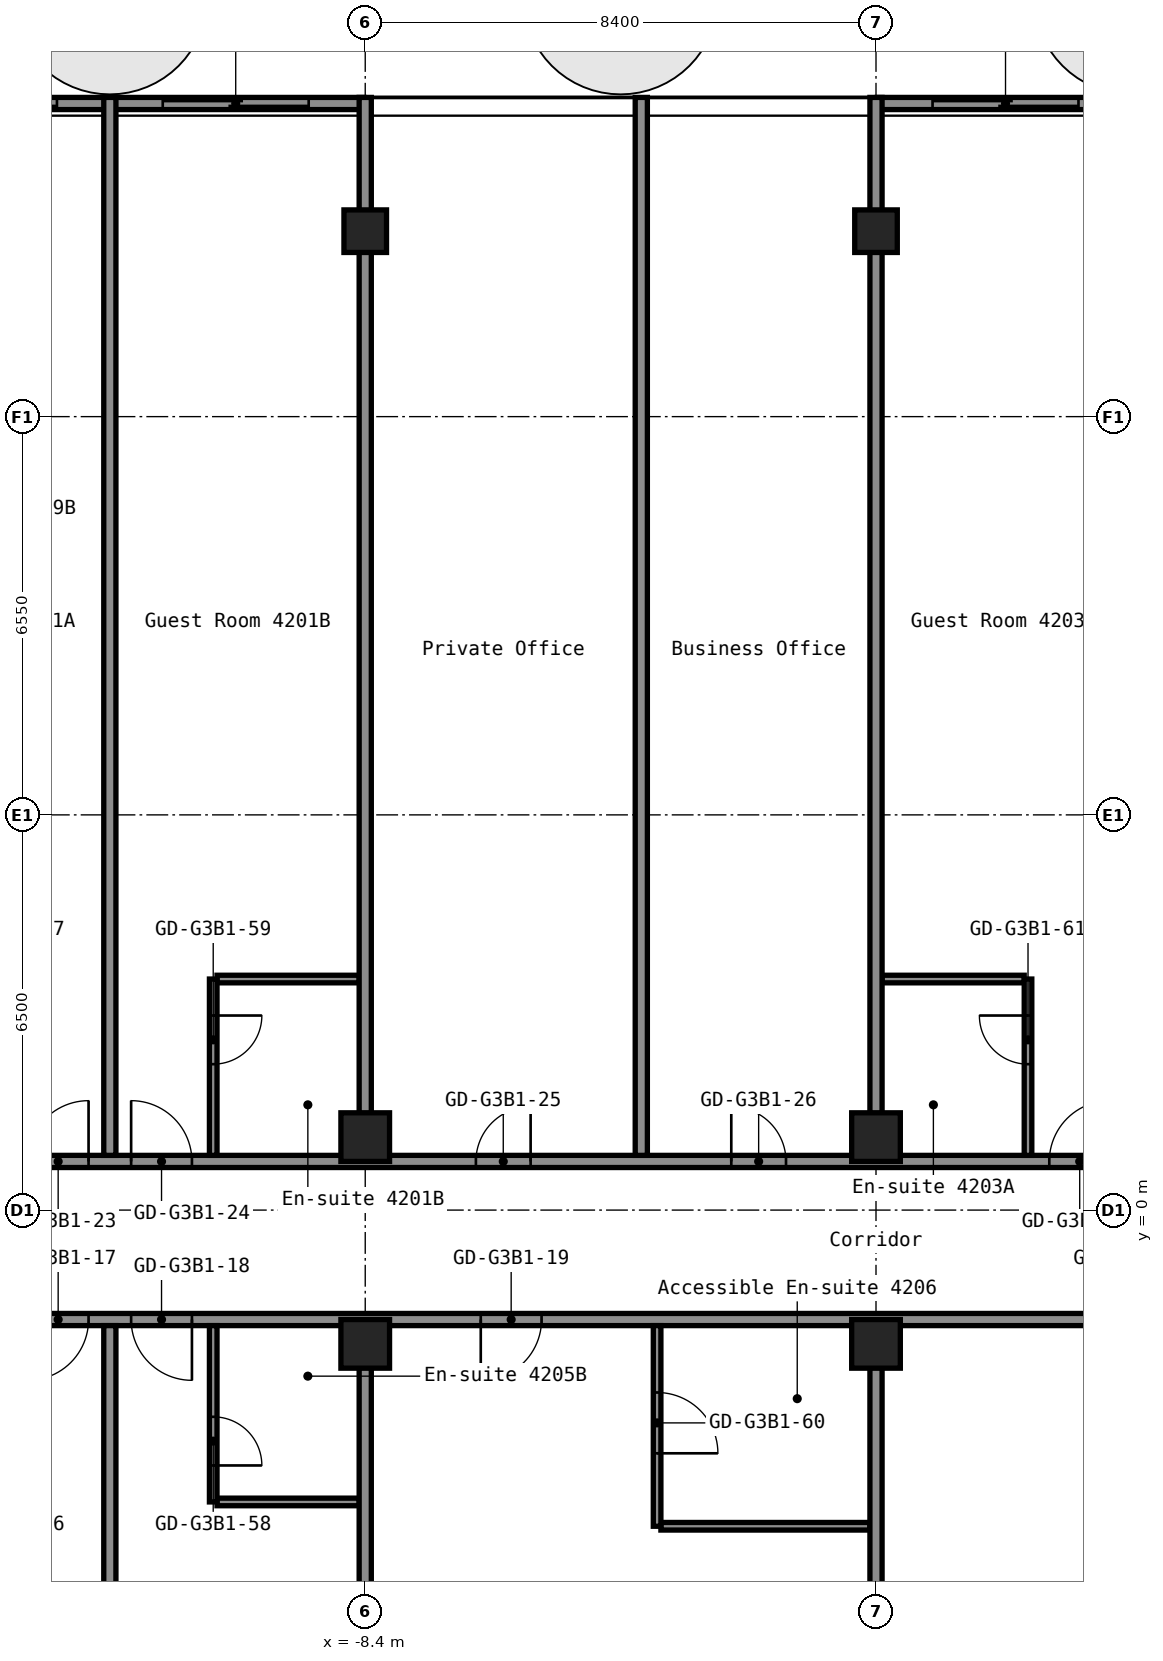
"""IFC4 building model, lengths in metres.
Left out: names, types, materials, properties, quantities, classifications, styles, units other than length and angle.
Written with IfcOpenShell. Run it as: python <this file> out.ifc"""

import sys

from ifc_helpers import new_model, si_unit, direction, frame, frame_2d, origin, origin_2d, place, context, subcontext, project, spatial, rectangle, hollow_rectangle, extrude, element, fill, save


model = new_model("IFC4")
c1 = context("Model", 3, precision=1e-05, world=origin(), true_north=direction((0.0, 1.0)))
c2 = subcontext(c1, "Body", "Model", "MODEL_VIEW")
j1 = project(units=[si_unit("LENGTHUNIT", "METRE"), si_unit("PLANEANGLEUNIT", "RADIAN")], contexts=[c1])
p1 = place(None, origin())
s1 = spatial("IfcSite", under=j1, at=p1, CompositionType="ELEMENT")
p2 = place(p1, origin())
s2 = spatial("IfcBuilding", under=s1, at=p2, CompositionType="ELEMENT")
p3 = place(p2, frame((0.0, 0.0, 150.2)))
s3 = spatial("IfcBuildingStorey", under=s2, at=p3, CompositionType="ELEMENT", Elevation=150.2)
for number, where, z_axis, x_axis in (
    (1, (-8.4, -2.2, 0.0), (0.0, 0.0, 1.0), (1.0, 0.0, 0.0)),
    (2, (-8.4, 1.2, 0.0), (0.0, 0.0, 1.0), (1.0, 0.0, 0.0)),
):
    element("IfcColumn", number, at=place(p3, frame(where, z_axis=z_axis, x_axis=x_axis)), inside=s3, PredefinedType="COLUMN", context=c2, shape_type="SweptSolid", body=[
        extrude(hollow_rectangle(XDim=0.8, YDim=0.8, WallThickness=0.032, at=origin_2d()), origin(), (0.0, 0.0, 1.0), 2.75),
    ])
p4 = place(p3, frame((-8.4, 16.1, 0.0), z_axis=(0.0, 0.0, 1.0), x_axis=(1.0, 0.0, 0.0)))
e3 = element("IfcColumn", 3, at=p4, inside=s3, PredefinedType="COLUMN", context=c2, shape_type="SweptSolid", body=[
    extrude(hollow_rectangle(XDim=0.7, YDim=0.7, WallThickness=0.028, at=origin_2d()), origin(), (0.0, 0.0, 1.0), 2.75),
])
for number, where, z_axis, x_axis in (
    (4, (0.0, -2.2, 0.0), (0.0, 0.0, 1.0), (1.0, 0.0, 0.0)),
    (5, (0.0, 1.2, 0.0), (0.0, 0.0, 1.0), (1.0, 0.0, 0.0)),
):
    element("IfcColumn", number, at=place(p3, frame(where, z_axis=z_axis, x_axis=x_axis)), inside=s3, PredefinedType="COLUMN", context=c2, shape_type="SweptSolid", body=[
        extrude(hollow_rectangle(XDim=0.8, YDim=0.8, WallThickness=0.032, at=origin_2d()), origin(), (0.0, 0.0, 1.0), 2.75),
    ])
p5 = place(p3, frame((0.0, 16.1, 0.0), z_axis=(0.0, 0.0, 1.0), x_axis=(1.0, 0.0, 0.0)))
e6 = element("IfcColumn", 6, at=p5, inside=s3, PredefinedType="COLUMN", context=c2, shape_type="SweptSolid", body=[
    extrude(hollow_rectangle(XDim=0.7, YDim=0.7, WallThickness=0.028, at=origin_2d()), origin(), (0.0, 0.0, 1.0), 2.75),
])
p6 = place(p3, frame((-3.538, -5.2, 0.0), z_axis=(0.0, 0.0, 1.0), x_axis=(1.0, 0.0, 0.0)))
e7 = element("IfcWall", 7, at=p6, inside=s3, PredefinedType="PARTITIONING", context=c2, shape_type="SweptSolid", body=[
    extrude(rectangle(XDim=3.438, YDim=0.125, at=frame_2d((1.719, 0.0))), origin(), (0.0, 0.0, 1.0), 2.75),
])
p7 = place(p3, frame((-10.837, -4.8, 0.0), z_axis=(0.0, 0.0, 1.0), x_axis=(1.0, 0.0, 0.0)))
e8 = element("IfcWall", 8, at=p7, inside=s3, PredefinedType="PARTITIONING", context=c2, shape_type="SweptSolid", body=[
    extrude(rectangle(XDim=2.337, YDim=0.125, at=frame_2d((1.169, 0.0))), origin(), (0.0, 0.0, 1.0), 2.75),
])
p8 = place(p3, frame((-16.8, -1.8, 0.0), z_axis=(0.0, 0.0, 1.0), x_axis=(1.0, 0.0, 0.0)))
e9 = element("IfcWall", 9, at=p8, inside=s3, PredefinedType="PARTITIONING", context=c2, shape_type="SweptSolid", body=[
    extrude(rectangle(XDim=33.6, YDim=0.2, at=frame_2d((16.8, 0.0))), origin(), (0.0, 0.0, 1.0), 2.75),
])
p9 = place(p8, frame((2.85, 0.0, 0.0)))
e10 = element("IfcOpeningElement", 10, at=p9, cuts=e9, PredefinedType="OPENING", context=c2, shape_type="SweptSolid", body=[
    extrude(rectangle(XDim=1.0, YDim=2.1, at=frame_2d((0.5, 1.05))), frame((0.0, 0.11, 0.0), z_axis=(0.0, -1.0, 0.0), x_axis=(1.0, 0.0, 0.0)), (0.0, 0.0, 1.0), 0.22),
])
p10 = place(p8, frame((4.55, 0.0, 0.0)))
e11 = element("IfcOpeningElement", 11, at=p10, cuts=e9, PredefinedType="OPENING", context=c2, shape_type="SweptSolid", body=[
    extrude(rectangle(XDim=1.0, YDim=2.1, at=frame_2d((0.5, 1.05))), frame((0.0, 0.11, 0.0), z_axis=(0.0, -1.0, 0.0), x_axis=(1.0, 0.0, 0.0)), (0.0, 0.0, 1.0), 0.22),
])
p11 = place(p8, frame((10.3, 0.0, 0.0)))
e12 = element("IfcOpeningElement", 12, at=p11, cuts=e9, PredefinedType="OPENING", context=c2, shape_type="SweptSolid", body=[
    extrude(rectangle(XDim=1.0, YDim=2.1, at=frame_2d((0.5, 1.05))), frame((0.0, 0.11, 0.0), z_axis=(0.0, -1.0, 0.0), x_axis=(1.0, 0.0, 0.0)), (0.0, 0.0, 1.0), 0.22),
])
p12 = place(p8, frame((20.5, 0.0, 0.0)))
e13 = element("IfcOpeningElement", 13, at=p12, cuts=e9, PredefinedType="OPENING", context=c2, shape_type="SweptSolid", body=[
    extrude(rectangle(XDim=1.0, YDim=2.1, at=frame_2d((0.5, 1.05))), frame((0.0, 0.11, 0.0), z_axis=(0.0, -1.0, 0.0), x_axis=(1.0, 0.0, 0.0)), (0.0, 0.0, 1.0), 0.22),
])
p13 = place(p8, frame((28.05, 0.0, 0.0)))
e14 = element("IfcOpeningElement", 14, at=p13, cuts=e9, PredefinedType="OPENING", context=c2, shape_type="SweptSolid", body=[
    extrude(rectangle(XDim=1.0, YDim=2.1, at=frame_2d((0.5, 1.05))), frame((0.0, 0.11, 0.0), z_axis=(0.0, -1.0, 0.0), x_axis=(1.0, 0.0, 0.0)), (0.0, 0.0, 1.0), 0.22),
])
p14 = place(p8, frame((29.75, 0.0, 0.0)))
e15 = element("IfcOpeningElement", 15, at=p14, cuts=e9, PredefinedType="OPENING", context=c2, shape_type="SweptSolid", body=[
    extrude(rectangle(XDim=1.0, YDim=2.1, at=frame_2d((0.5, 1.05))), frame((0.0, 0.11, 0.0), z_axis=(0.0, -1.0, 0.0), x_axis=(1.0, 0.0, 0.0)), (0.0, 0.0, 1.0), 0.22),
])
p15 = place(p3, frame((-16.8, 0.8, 0.0), z_axis=(0.0, 0.0, 1.0), x_axis=(1.0, 0.0, 0.0)))
e16 = element("IfcWall", 16, at=p15, inside=s3, PredefinedType="PARTITIONING", context=c2, shape_type="SweptSolid", body=[
    extrude(rectangle(XDim=33.6, YDim=0.2, at=frame_2d((16.8, 0.0))), origin(), (0.0, 0.0, 1.0), 2.75),
])
p16 = place(p15, frame((2.85, 0.0, 0.0)))
e17 = element("IfcOpeningElement", 17, at=p16, cuts=e16, PredefinedType="OPENING", context=c2, shape_type="SweptSolid", body=[
    extrude(rectangle(XDim=1.0, YDim=2.1, at=frame_2d((0.5, 1.05))), frame((0.0, 0.11, 0.0), z_axis=(0.0, -1.0, 0.0), x_axis=(1.0, 0.0, 0.0)), (0.0, 0.0, 1.0), 0.22),
])
p17 = place(p15, frame((4.55, 0.0, 0.0)))
e18 = element("IfcOpeningElement", 18, at=p17, cuts=e16, PredefinedType="OPENING", context=c2, shape_type="SweptSolid", body=[
    extrude(rectangle(XDim=1.0, YDim=2.1, at=frame_2d((0.5, 1.05))), frame((0.0, 0.11, 0.0), z_axis=(0.0, -1.0, 0.0), x_axis=(1.0, 0.0, 0.0)), (0.0, 0.0, 1.0), 0.22),
])
p18 = place(p15, frame((10.22, 0.0, 0.0)))
e19 = element("IfcOpeningElement", 19, at=p18, cuts=e16, PredefinedType="OPENING", context=c2, shape_type="SweptSolid", body=[
    extrude(rectangle(XDim=0.9, YDim=2.1, at=frame_2d((0.45, 1.05))), frame((0.0, 0.11, 0.0), z_axis=(0.0, -1.0, 0.0), x_axis=(1.0, 0.0, 0.0)), (0.0, 0.0, 1.0), 0.22),
])
p19 = place(p15, frame((14.42, 0.0, 0.0)))
e20 = element("IfcOpeningElement", 20, at=p19, cuts=e16, PredefinedType="OPENING", context=c2, shape_type="SweptSolid", body=[
    extrude(rectangle(XDim=0.9, YDim=2.1, at=frame_2d((0.45, 1.05))), frame((0.0, 0.11, 0.0), z_axis=(0.0, -1.0, 0.0), x_axis=(1.0, 0.0, 0.0)), (0.0, 0.0, 1.0), 0.22),
])
p20 = place(p15, frame((19.65, 0.0, 0.0)))
e21 = element("IfcOpeningElement", 21, at=p20, cuts=e16, PredefinedType="OPENING", context=c2, shape_type="SweptSolid", body=[
    extrude(rectangle(XDim=1.0, YDim=2.1, at=frame_2d((0.5, 1.05))), frame((0.0, 0.11, 0.0), z_axis=(0.0, -1.0, 0.0), x_axis=(1.0, 0.0, 0.0)), (0.0, 0.0, 1.0), 0.22),
])
p21 = place(p15, frame((21.35, 0.0, 0.0)))
e22 = element("IfcOpeningElement", 22, at=p21, cuts=e16, PredefinedType="OPENING", context=c2, shape_type="SweptSolid", body=[
    extrude(rectangle(XDim=1.0, YDim=2.1, at=frame_2d((0.5, 1.05))), frame((0.0, 0.11, 0.0), z_axis=(0.0, -1.0, 0.0), x_axis=(1.0, 0.0, 0.0)), (0.0, 0.0, 1.0), 0.22),
])
p22 = place(p15, frame((28.05, 0.0, 0.0)))
e23 = element("IfcOpeningElement", 23, at=p22, cuts=e16, PredefinedType="OPENING", context=c2, shape_type="SweptSolid", body=[
    extrude(rectangle(XDim=1.0, YDim=2.1, at=frame_2d((0.5, 1.05))), frame((0.0, 0.11, 0.0), z_axis=(0.0, -1.0, 0.0), x_axis=(1.0, 0.0, 0.0)), (0.0, 0.0, 1.0), 0.22),
])
p23 = place(p15, frame((29.75, 0.0, 0.0)))
e24 = element("IfcOpeningElement", 24, at=p23, cuts=e16, PredefinedType="OPENING", context=c2, shape_type="SweptSolid", body=[
    extrude(rectangle(XDim=1.0, YDim=2.1, at=frame_2d((0.5, 1.05))), frame((0.0, 0.11, 0.0), z_axis=(0.0, -1.0, 0.0), x_axis=(1.0, 0.0, 0.0)), (0.0, 0.0, 1.0), 0.22),
])
for number, where, z_axis, x_axis in (
    (25, (-10.837, 3.8, 0.0), (0.0, 0.0, 1.0), (1.0, 0.0, 0.0)),
    (26, (0.1, 3.8, 0.0), (0.0, 0.0, 1.0), (1.0, 0.0, 0.0)),
):
    element("IfcWall", number, at=place(p3, frame(where, z_axis=z_axis, x_axis=x_axis)), inside=s3, PredefinedType="PARTITIONING", context=c2, shape_type="SweptSolid", body=[
        extrude(rectangle(XDim=2.337, YDim=0.125, at=frame_2d((1.169, 0.0))), origin(), (0.0, 0.0, 1.0), 2.75),
    ])
for number, where, z_axis, x_axis in (
    (27, (-12.6, -19.3, 0.0), (0.0, 0.0, 1.0), (0.0, 1.0, 0.0)),
    (28, (-12.6, 0.9, 0.0), (0.0, 0.0, 1.0), (0.0, 1.0, 0.0)),
):
    element("IfcWall", number, at=place(p3, frame(where, z_axis=z_axis, x_axis=x_axis)), inside=s3, PredefinedType="PARTITIONING", context=c2, shape_type="SweptSolid", body=[
        extrude(rectangle(XDim=17.4, YDim=0.2, at=frame_2d((8.7, 0.0))), origin(), (0.0, 0.0, 1.0), 2.75),
    ])
p24 = place(p3, frame((-10.9, -4.8, 0.0), z_axis=(0.0, 0.0, 1.0), x_axis=(0.0, 1.0, 0.0)))
e29 = element("IfcWall", 29, at=p24, inside=s3, PredefinedType="PARTITIONING", context=c2, shape_type="SweptSolid", body=[
    extrude(rectangle(XDim=2.9, YDim=0.125, at=frame_2d((1.45, 0.0))), origin(), (0.0, 0.0, 1.0), 2.75),
])
p25 = place(p24, frame((0.6, 0.0, 0.0)))
e30 = element("IfcOpeningElement", 30, at=p25, cuts=e29, PredefinedType="OPENING", context=c2, shape_type="SweptSolid", body=[
    extrude(rectangle(XDim=0.8, YDim=2.1, at=frame_2d((0.4, 1.05))), frame((0.0, 0.073, 0.0), z_axis=(0.0, -1.0, 0.0), x_axis=(1.0, 0.0, 0.0)), (0.0, 0.0, 1.0), 0.145),
])
p26 = place(p3, frame((-10.9, 0.9, 0.0), z_axis=(0.0, 0.0, 1.0), x_axis=(0.0, 1.0, 0.0)))
e31 = element("IfcWall", 31, at=p26, inside=s3, PredefinedType="PARTITIONING", context=c2, shape_type="SweptSolid", body=[
    extrude(rectangle(XDim=2.9, YDim=0.125, at=frame_2d((1.45, 0.0))), origin(), (0.0, 0.0, 1.0), 2.75),
])
p27 = place(p26, frame((1.5, 0.0, 0.0)))
e32 = element("IfcOpeningElement", 32, at=p27, cuts=e31, PredefinedType="OPENING", context=c2, shape_type="SweptSolid", body=[
    extrude(rectangle(XDim=0.8, YDim=2.1, at=frame_2d((0.4, 1.05))), frame((0.0, 0.073, 0.0), z_axis=(0.0, -1.0, 0.0), x_axis=(1.0, 0.0, 0.0)), (0.0, 0.0, 1.0), 0.145),
])
for number, where, z_axis, x_axis in (
    (33, (-8.4, -19.3, 0.0), (0.0, 0.0, 1.0), (0.0, 1.0, 0.0)),
    (34, (-8.4, 1.59, 0.0), (0.0, 0.0, 1.0), (0.0, 1.0, 0.0)),
):
    element("IfcWall", number, at=place(p3, frame(where, z_axis=z_axis, x_axis=x_axis)), inside=s3, PredefinedType="PARTITIONING", context=c2, shape_type="SweptSolid", body=[
        extrude(rectangle(XDim=16.71, YDim=0.2, at=frame_2d((8.355, 0.0))), origin(), (0.0, 0.0, 1.0), 2.75),
    ])
p28 = place(p3, frame((-3.86, 0.9, 0.0), z_axis=(0.0, 0.0, 1.0), x_axis=(0.0, 1.0, 0.0)))
e35 = element("IfcWall", 35, at=p28, inside=s3, PredefinedType="PARTITIONING", context=c2, shape_type="SweptSolid", body=[
    extrude(rectangle(XDim=17.4, YDim=0.2, at=frame_2d((8.7, 0.0))), origin(), (0.0, 0.0, 1.0), 2.75),
])
p29 = place(p3, frame((-3.6, -5.2, 0.0), z_axis=(0.0, 0.0, 1.0), x_axis=(0.0, 1.0, 0.0)))
e36 = element("IfcWall", 36, at=p29, inside=s3, PredefinedType="PARTITIONING", context=c2, shape_type="SweptSolid", body=[
    extrude(rectangle(XDim=3.3, YDim=0.125, at=frame_2d((1.65, 0.0))), origin(), (0.0, 0.0, 1.0), 2.75),
])
p30 = place(p29, frame((1.2, 0.0, 0.0)))
e37 = element("IfcOpeningElement", 37, at=p30, cuts=e36, PredefinedType="OPENING", context=c2, shape_type="SweptSolid", body=[
    extrude(rectangle(XDim=1.0, YDim=2.1, at=frame_2d((0.5, 1.05))), frame((0.0, 0.073, 0.0), z_axis=(0.0, -1.0, 0.0), x_axis=(1.0, 0.0, 0.0)), (0.0, 0.0, 1.0), 0.145),
])
for number, where, z_axis, x_axis in (
    (38, (0.0, -19.3, 0.0), (0.0, 0.0, 1.0), (0.0, 1.0, 0.0)),
    (39, (0.0, 1.59, 0.0), (0.0, 0.0, 1.0), (0.0, 1.0, 0.0)),
):
    element("IfcWall", number, at=place(p3, frame(where, z_axis=z_axis, x_axis=x_axis)), inside=s3, PredefinedType="PARTITIONING", context=c2, shape_type="SweptSolid", body=[
        extrude(rectangle(XDim=16.71, YDim=0.2, at=frame_2d((8.355, 0.0))), origin(), (0.0, 0.0, 1.0), 2.75),
    ])
p31 = place(p3, frame((2.5, 0.9, 0.0), z_axis=(0.0, 0.0, 1.0), x_axis=(0.0, 1.0, 0.0)))
e40 = element("IfcWall", 40, at=p31, inside=s3, PredefinedType="PARTITIONING", context=c2, shape_type="SweptSolid", body=[
    extrude(rectangle(XDim=2.9, YDim=0.125, at=frame_2d((1.45, 0.0))), origin(), (0.0, 0.0, 1.0), 2.75),
])
p32 = place(p31, frame((1.5, 0.0, 0.0)))
e41 = element("IfcOpeningElement", 41, at=p32, cuts=e40, PredefinedType="OPENING", context=c2, shape_type="SweptSolid", body=[
    extrude(rectangle(XDim=0.8, YDim=2.1, at=frame_2d((0.4, 1.05))), frame((0.0, 0.073, 0.0), z_axis=(0.0, -1.0, 0.0), x_axis=(1.0, 0.0, 0.0)), (0.0, 0.0, 1.0), 0.145),
])
p33 = place(p3, frame((4.24, 18.2, 0.0), z_axis=(0.0, 0.0, 1.0), x_axis=(-1.0, 0.0, 0.0)))
p34 = place(p33, frame((0.91, 0.0, 0.0)))
p35 = place(p34, frame((2.4, 0.0, 0.0), z_axis=(0.0, 0.0, 1.0), x_axis=(-1.0, 0.0, 0.0)))
e42 = element("IfcDoor", 42, at=p35, inside=s3, OperationType="SLIDING_TO_LEFT", PredefinedType="DOOR", context=c2, shape_type="SweptSolid", body=[
    extrude(rectangle(XDim=2.4, YDim=2.2, at=frame_2d((1.2, 1.1))), frame((0.0, 0.025, 0.0), z_axis=(0.0, -1.0, 0.0), x_axis=(1.0, 0.0, 0.0)), (0.0, 0.0, 1.0), 0.05),
])
p36 = place(p3, frame((-8.42, 18.2, 0.0), z_axis=(0.0, 0.0, 1.0), x_axis=(-1.0, 0.0, 0.0)))
p37 = place(p36, frame((0.91, 0.0, 0.0)))
p38 = place(p37, frame((2.4, 0.0, 0.0), z_axis=(0.0, 0.0, 1.0), x_axis=(-1.0, 0.0, 0.0)))
e43 = element("IfcDoor", 43, at=p38, inside=s3, OperationType="SLIDING_TO_LEFT", PredefinedType="DOOR", context=c2, shape_type="SweptSolid", body=[
    extrude(rectangle(XDim=2.4, YDim=2.2, at=frame_2d((1.2, 1.1))), frame((0.0, 0.025, 0.0), z_axis=(0.0, -1.0, 0.0), x_axis=(1.0, 0.0, 0.0)), (0.0, 0.0, 1.0), 0.05),
])
p39 = place(p3, frame((-12.56, 18.2, 0.0), z_axis=(0.0, 0.0, 1.0), x_axis=(-1.0, 0.0, 0.0)))
p40 = place(p39, frame((0.91, 0.0, 0.0)))
p41 = place(p40, frame((2.4, 0.0, 0.0), z_axis=(0.0, 0.0, 1.0), x_axis=(-1.0, 0.0, 0.0)))
e44 = element("IfcDoor", 44, at=p41, inside=s3, OperationType="SLIDING_TO_LEFT", PredefinedType="DOOR", context=c2, shape_type="SweptSolid", body=[
    extrude(rectangle(XDim=2.4, YDim=2.2, at=frame_2d((1.2, 1.1))), frame((0.0, 0.025, 0.0), z_axis=(0.0, -1.0, 0.0), x_axis=(1.0, 0.0, 0.0)), (0.0, 0.0, 1.0), 0.05),
])
p42 = place(p9, origin())
e45 = element("IfcDoor", 45, at=p42, inside=s3, OperationType="SINGLE_SWING_LEFT", PredefinedType="DOOR", context=c2, shape_type="SweptSolid", body=[
    extrude(rectangle(XDim=1.0, YDim=2.1, at=frame_2d((0.5, 1.05))), frame((0.0, 0.025, 0.0), z_axis=(0.0, -1.0, 0.0), x_axis=(1.0, 0.0, 0.0)), (0.0, 0.0, 1.0), 0.05),
])
fill(e10, e45)
p43 = place(p10, origin())
e46 = element("IfcDoor", 46, at=p43, inside=s3, OperationType="SINGLE_SWING_RIGHT", PredefinedType="DOOR", context=c2, shape_type="SweptSolid", body=[
    extrude(rectangle(XDim=1.0, YDim=2.1, at=frame_2d((0.5, 1.05))), frame((0.0, 0.025, 0.0), z_axis=(0.0, -1.0, 0.0), x_axis=(1.0, 0.0, 0.0)), (0.0, 0.0, 1.0), 0.05),
])
fill(e11, e46)
p44 = place(p11, origin())
e47 = element("IfcDoor", 47, at=p44, inside=s3, OperationType="SINGLE_SWING_LEFT", PredefinedType="DOOR", context=c2, shape_type="SweptSolid", body=[
    extrude(rectangle(XDim=1.0, YDim=2.1, at=frame_2d((0.5, 1.05))), frame((0.0, 0.025, 0.0), z_axis=(0.0, -1.0, 0.0), x_axis=(1.0, 0.0, 0.0)), (0.0, 0.0, 1.0), 0.05),
])
fill(e12, e47)
p45 = place(p16, origin())
e48 = element("IfcDoor", 48, at=p45, inside=s3, OperationType="SINGLE_SWING_LEFT", PredefinedType="DOOR", context=c2, shape_type="SweptSolid", body=[
    extrude(rectangle(XDim=1.0, YDim=2.1, at=frame_2d((0.5, 1.05))), frame((0.0, 0.025, 0.0), z_axis=(0.0, -1.0, 0.0), x_axis=(1.0, 0.0, 0.0)), (0.0, 0.0, 1.0), 0.05),
])
fill(e17, e48)
p46 = place(p17, origin())
e49 = element("IfcDoor", 49, at=p46, inside=s3, OperationType="SINGLE_SWING_RIGHT", PredefinedType="DOOR", context=c2, shape_type="SweptSolid", body=[
    extrude(rectangle(XDim=1.0, YDim=2.1, at=frame_2d((0.5, 1.05))), frame((0.0, 0.025, 0.0), z_axis=(0.0, -1.0, 0.0), x_axis=(1.0, 0.0, 0.0)), (0.0, 0.0, 1.0), 0.05),
])
fill(e18, e49)
p47 = place(p18, origin())
e50 = element("IfcDoor", 50, at=p47, inside=s3, OperationType="SINGLE_SWING_LEFT", PredefinedType="DOOR", context=c2, shape_type="SweptSolid", body=[
    extrude(rectangle(XDim=0.9, YDim=2.1, at=frame_2d((0.45, 1.05))), frame((0.0, 0.025, 0.0), z_axis=(0.0, -1.0, 0.0), x_axis=(1.0, 0.0, 0.0)), (0.0, 0.0, 1.0), 0.05),
])
fill(e19, e50)
p48 = place(p19, origin())
e51 = element("IfcDoor", 51, at=p48, inside=s3, OperationType="SINGLE_SWING_RIGHT", PredefinedType="DOOR", context=c2, shape_type="SweptSolid", body=[
    extrude(rectangle(XDim=0.9, YDim=2.1, at=frame_2d((0.45, 1.05))), frame((0.0, 0.025, 0.0), z_axis=(0.0, -1.0, 0.0), x_axis=(1.0, 0.0, 0.0)), (0.0, 0.0, 1.0), 0.05),
])
fill(e20, e51)
p49 = place(p20, origin())
e52 = element("IfcDoor", 52, at=p49, inside=s3, OperationType="SINGLE_SWING_LEFT", PredefinedType="DOOR", context=c2, shape_type="SweptSolid", body=[
    extrude(rectangle(XDim=1.0, YDim=2.1, at=frame_2d((0.5, 1.05))), frame((0.0, 0.025, 0.0), z_axis=(0.0, -1.0, 0.0), x_axis=(1.0, 0.0, 0.0)), (0.0, 0.0, 1.0), 0.05),
])
fill(e21, e52)
p50 = place(p25, origin())
e53 = element("IfcDoor", 53, at=p50, inside=s3, OperationType="SINGLE_SWING_LEFT", PredefinedType="DOOR", context=c2, shape_type="SweptSolid", body=[
    extrude(rectangle(XDim=0.8, YDim=2.1, at=frame_2d((0.4, 1.05))), frame((0.0, 0.025, 0.0), z_axis=(0.0, -1.0, 0.0), x_axis=(1.0, 0.0, 0.0)), (0.0, 0.0, 1.0), 0.05),
])
fill(e30, e53)
p51 = place(p27, origin())
e54 = element("IfcDoor", 54, at=p51, inside=s3, OperationType="SINGLE_SWING_RIGHT", PredefinedType="DOOR", context=c2, shape_type="SweptSolid", body=[
    extrude(rectangle(XDim=0.8, YDim=2.1, at=frame_2d((0.4, 1.05))), frame((0.0, 0.025, 0.0), z_axis=(0.0, -1.0, 0.0), x_axis=(1.0, 0.0, 0.0)), (0.0, 0.0, 1.0), 0.05),
])
fill(e32, e54)
p52 = place(p30, origin())
e55 = element("IfcDoor", 55, at=p52, inside=s3, OperationType="SINGLE_SWING_LEFT", PredefinedType="DOOR", context=c2, shape_type="SweptSolid", body=[
    extrude(rectangle(XDim=1.0, YDim=2.1, at=frame_2d((0.5, 1.05))), frame((0.0, 0.025, 0.0), z_axis=(0.0, -1.0, 0.0), x_axis=(1.0, 0.0, 0.0)), (0.0, 0.0, 1.0), 0.05),
])
fill(e37, e55)
p53 = place(p32, origin())
e56 = element("IfcDoor", 56, at=p53, inside=s3, OperationType="SINGLE_SWING_LEFT", PredefinedType="DOOR", context=c2, shape_type="SweptSolid", body=[
    extrude(rectangle(XDim=0.8, YDim=2.1, at=frame_2d((0.4, 1.05))), frame((0.0, 0.025, 0.0), z_axis=(0.0, -1.0, 0.0), x_axis=(1.0, 0.0, 0.0)), (0.0, 0.0, 1.0), 0.05),
])
fill(e41, e56)
save(model, sys.argv[1])
